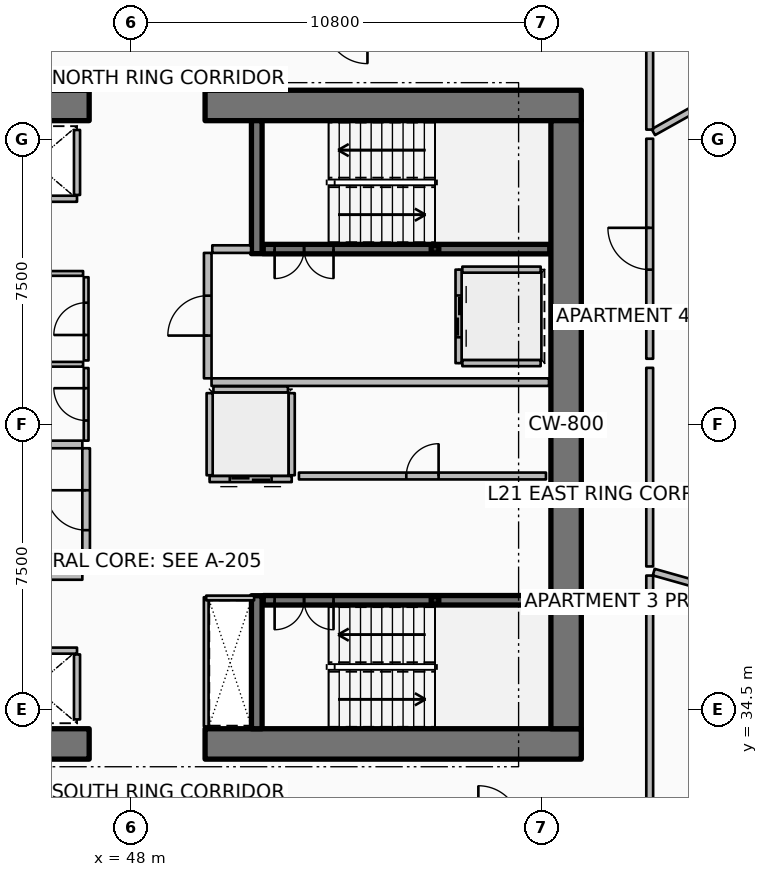
"""IFC4 building model, lengths in metres.
Left out: names, types, materials, properties, quantities, classifications, styles, units other than length and angle.
Written with IfcOpenShell. Run it as: python <this file> out.ifc"""

import sys

from ifc_helpers import new_model, si_unit, direction, frame, frame_2d, origin, origin_2d, place, context, subcontext, project, spatial, rectangle, hollow_rectangle, extrude, element, fill, save


model = new_model("IFC4")
c1 = context("Model", 3, precision=1e-05, world=origin(), true_north=direction((0.0, 1.0)))
c2 = subcontext(c1, "Body", "Model", "MODEL_VIEW")
j1 = project(units=[si_unit("LENGTHUNIT", "METRE"), si_unit("PLANEANGLEUNIT", "RADIAN")], contexts=[c1])
p1 = place(None, origin())
s1 = spatial("IfcSite", under=j1, at=p1, CompositionType="ELEMENT")
p2 = place(p1, origin())
s2 = spatial("IfcBuilding", under=s1, at=p2, CompositionType="ELEMENT")
p3 = place(p2, frame((0.0, 0.0, 86.4)))
s3 = spatial("IfcBuildingStorey", under=s2, at=p3, CompositionType="ELEMENT", Elevation=86.4)
p4 = place(p3, frame((37.0, 33.6, 0.0), z_axis=(0.0, 0.0, 1.0), x_axis=(1.0, 0.0, 0.0)))
e1 = element("IfcWall", 1, at=p4, inside=s3, PredefinedType="SHEAR", context=c2, shape_type="SweptSolid", body=[
    extrude(rectangle(XDim=9.9, YDim=0.8, at=frame_2d((4.95, 0.0))), origin(), (0.0, 0.0, 1.0), 3.75),
])
p5 = place(p3, frame((49.95, 33.6, 0.0), z_axis=(0.0, 0.0, 1.0), x_axis=(1.0, 0.0, 0.0)))
e2 = element("IfcWall", 2, at=p5, inside=s3, PredefinedType="SHEAR", context=c2, shape_type="SweptSolid", body=[
    extrude(rectangle(XDim=9.9, YDim=0.8, at=frame_2d((4.95, 0.0))), origin(), (0.0, 0.0, 1.0), 3.75),
])
p6 = place(p3, frame((37.0, 50.4, 0.0), z_axis=(0.0, 0.0, 1.0), x_axis=(1.0, 0.0, 0.0)))
e3 = element("IfcWall", 3, at=p6, inside=s3, PredefinedType="SHEAR", context=c2, shape_type="SweptSolid", body=[
    extrude(rectangle(XDim=9.9, YDim=0.8, at=frame_2d((4.95, 0.0))), origin(), (0.0, 0.0, 1.0), 3.75),
])
p7 = place(p3, frame((49.95, 50.4, 0.0), z_axis=(0.0, 0.0, 1.0), x_axis=(1.0, 0.0, 0.0)))
e4 = element("IfcWall", 4, at=p7, inside=s3, PredefinedType="SHEAR", context=c2, shape_type="SweptSolid", body=[
    extrude(rectangle(XDim=9.9, YDim=0.8, at=frame_2d((4.95, 0.0))), origin(), (0.0, 0.0, 1.0), 3.75),
])
p8 = place(p3, frame((59.45, 34.0, 0.0), z_axis=(0.0, 0.0, 1.0), x_axis=(0.0, 1.0, 0.0)))
e5 = element("IfcWall", 5, at=p8, inside=s3, PredefinedType="SHEAR", context=c2, shape_type="SweptSolid", body=[
    extrude(rectangle(XDim=16.0, YDim=0.8, at=frame_2d((8.0, 0.0))), origin(), (0.0, 0.0, 1.0), 3.75),
])
for number, where, z_axis, x_axis in (
    (6, (51.31, 46.5, 0.0), (0.0, 0.0, 1.0), (0.0, 1.0, 0.0)),
    (7, (51.31, 34.0, 0.0), (0.0, 0.0, 1.0), (0.0, 1.0, 0.0)),
):
    element("IfcWall", number, at=place(p3, frame(where, z_axis=z_axis, x_axis=x_axis)), inside=s3, PredefinedType="SHEAR", context=c2, shape_type="SweptSolid", body=[
        extrude(rectangle(XDim=3.5, YDim=0.28, at=frame_2d((1.75, 0.0))), origin(), (0.0, 0.0, 1.0), 3.75),
    ])
for number, where, z_axis, x_axis in (
    (8, (56.0, 46.62, 0.0), (0.0, 0.0, 1.0), (1.0, 0.0, 0.0)),
    (9, (56.0, 37.38, 0.0), (0.0, 0.0, 1.0), (1.0, 0.0, 0.0)),
):
    element("IfcColumn", number, at=place(p3, frame(where, z_axis=z_axis, x_axis=x_axis)), inside=s3, PredefinedType="COLUMN", context=c2, shape_type="SweptSolid", body=[
        extrude(hollow_rectangle(XDim=0.2, YDim=0.2, WallThickness=0.01, InnerFilletRadius=0.01, OuterFilletRadius=0.02, at=origin_2d()), origin(), (0.0, 0.0, 1.0), 1.67),
    ])
p9 = place(p3, frame((51.48, 46.62, 0.0), z_axis=(0.0, 0.0, 1.0), x_axis=(1.0, 0.0, 0.0)))
e10 = element("IfcWall", 10, at=p9, inside=s3, PredefinedType="SOLIDWALL", context=c2, shape_type="SweptSolid", body=[
    extrude(rectangle(XDim=7.54, YDim=0.25, at=frame_2d((3.77, 0.0))), origin(), (0.0, 0.0, 1.0), 3.5),
])
p10 = place(p9, frame((0.3, 0.0, 0.0)))
e11 = element("IfcOpeningElement", 11, at=p10, cuts=e10, PredefinedType="OPENING", context=c2, shape_type="SweptSolid", body=[
    extrude(rectangle(XDim=1.55, YDim=2.15, at=frame_2d((0.775, 1.075))), frame((0.0, 0.135, 0.0), z_axis=(0.0, -1.0, 0.0), x_axis=(1.0, 0.0, 0.0)), (0.0, 0.0, 1.0), 0.27),
])
p11 = place(p3, frame((51.48, 37.38, 0.0), z_axis=(0.0, 0.0, 1.0), x_axis=(1.0, 0.0, 0.0)))
e12 = element("IfcWall", 12, at=p11, inside=s3, PredefinedType="SOLIDWALL", context=c2, shape_type="SweptSolid", body=[
    extrude(rectangle(XDim=7.54, YDim=0.25, at=frame_2d((3.77, 0.0))), origin(), (0.0, 0.0, 1.0), 3.5),
])
p12 = place(p11, frame((0.3, 0.0, 0.0)))
e13 = element("IfcOpeningElement", 13, at=p12, cuts=e12, PredefinedType="OPENING", context=c2, shape_type="SweptSolid", body=[
    extrude(rectangle(XDim=1.55, YDim=2.15, at=frame_2d((0.775, 1.075))), frame((0.0, 0.135, 0.0), z_axis=(0.0, -1.0, 0.0), x_axis=(1.0, 0.0, 0.0)), (0.0, 0.0, 1.0), 0.27),
])
p13 = place(p3, frame((46.58, 47.945, 0.0), z_axis=(0.0, 0.0, 1.0), x_axis=(-1.0, 0.0, 0.0)))
e14 = element("IfcWall", 14, at=p13, inside=s3, PredefinedType="PARTITIONING", context=c2, shape_type="SweptSolid", body=[
    extrude(rectangle(XDim=2.26, YDim=0.16, at=frame_2d((1.13, 0.0))), origin(), (0.0, 0.0, 1.0), 3.5),
])
p14 = place(p3, frame((46.58, 48.045, 0.0), z_axis=(0.0, 0.0, 1.0), x_axis=(0.0, 1.0, 0.0)))
e15 = element("IfcWall", 15, at=p14, inside=s3, PredefinedType="PARTITIONING", context=c2, shape_type="SweptSolid", body=[
    extrude(rectangle(XDim=1.71, YDim=0.16, at=frame_2d((0.855, 0.0))), origin(), (0.0, 0.0, 1.0), 3.5),
])
p15 = place(p3, frame((44.32, 36.055, 0.0), z_axis=(0.0, 0.0, 1.0), x_axis=(1.0, 0.0, 0.0)))
e16 = element("IfcWall", 16, at=p15, inside=s3, PredefinedType="PARTITIONING", context=c2, shape_type="SweptSolid", body=[
    extrude(rectangle(XDim=2.26, YDim=0.16, at=frame_2d((1.13, 0.0))), origin(), (0.0, 0.0, 1.0), 3.5),
])
p16 = place(p3, frame((46.58, 34.245, 0.0), z_axis=(0.0, 0.0, 1.0), x_axis=(0.0, 1.0, 0.0)))
e17 = element("IfcWall", 17, at=p16, inside=s3, PredefinedType="PARTITIONING", context=c2, shape_type="SweptSolid", body=[
    extrude(rectangle(XDim=1.71, YDim=0.16, at=frame_2d((0.855, 0.0))), origin(), (0.0, 0.0, 1.0), 3.5),
])
p17 = place(p3, frame((56.62, 46.08, 0.0), z_axis=(0.0, 0.0, 1.0), x_axis=(0.0, -1.0, 0.0)))
e18 = element("IfcWall", 18, at=p17, inside=s3, PredefinedType="PARTITIONING", context=c2, shape_type="SweptSolid", body=[
    extrude(rectangle(XDim=2.46, YDim=0.16, at=frame_2d((1.23, 0.0))), origin(), (0.0, 0.0, 1.0), 3.5),
])
p18 = place(p17, frame((0.68, 0.0, 0.0)))
e19 = element("IfcOpeningElement", 19, at=p18, cuts=e18, PredefinedType="OPENING", context=c2, shape_type="SweptSolid", body=[
    extrude(rectangle(XDim=1.1, YDim=2.1, at=frame_2d((0.55, 1.05))), frame((0.0, 0.09, 0.0), z_axis=(0.0, -1.0, 0.0), x_axis=(1.0, 0.0, 0.0)), (0.0, 0.0, 1.0), 0.18),
])
for number, where, z_axis, x_axis in (
    (20, (56.72, 46.08, 0.0), (0.0, 0.0, 1.0), (1.0, 0.0, 0.0)),
    (21, (56.72, 43.62, 0.0), (0.0, 0.0, 1.0), (1.0, 0.0, 0.0)),
):
    element("IfcWall", number, at=place(p3, frame(where, z_axis=z_axis, x_axis=x_axis)), inside=s3, PredefinedType="PARTITIONING", context=c2, shape_type="SweptSolid", body=[
        extrude(rectangle(XDim=2.06, YDim=0.16, at=frame_2d((1.03, 0.0))), origin(), (0.0, 0.0, 1.0), 3.5),
    ])
p19 = place(p3, frame((52.23, 40.57, 0.0), z_axis=(0.0, 0.0, 1.0), x_axis=(-1.0, 0.0, 0.0)))
e22 = element("IfcWall", 22, at=p19, inside=s3, PredefinedType="PARTITIONING", context=c2, shape_type="SweptSolid", body=[
    extrude(rectangle(XDim=2.16, YDim=0.16, at=frame_2d((1.08, 0.0))), origin(), (0.0, 0.0, 1.0), 3.5),
])
p20 = place(p19, frame((0.53, 0.0, 0.0)))
e23 = element("IfcOpeningElement", 23, at=p20, cuts=e22, PredefinedType="OPENING", context=c2, shape_type="SweptSolid", body=[
    extrude(rectangle(XDim=1.1, YDim=2.1, at=frame_2d((0.55, 1.05))), frame((0.0, 0.09, 0.0), z_axis=(0.0, -1.0, 0.0), x_axis=(1.0, 0.0, 0.0)), (0.0, 0.0, 1.0), 0.18),
])
for number, where, z_axis, x_axis in (
    (24, (52.23, 40.67, 0.0), (0.0, 0.0, 1.0), (0.0, 1.0, 0.0)),
    (25, (50.07, 40.67, 0.0), (0.0, 0.0, 1.0), (0.0, 1.0, 0.0)),
):
    element("IfcWall", number, at=place(p3, frame(where, z_axis=z_axis, x_axis=x_axis)), inside=s3, PredefinedType="PARTITIONING", context=c2, shape_type="SweptSolid", body=[
        extrude(rectangle(XDim=2.16, YDim=0.16, at=frame_2d((1.08, 0.0))), origin(), (0.0, 0.0, 1.0), 3.5),
    ])
p21 = place(p3, frame((50.17, 42.93, 0.0), z_axis=(0.0, 0.0, 1.0), x_axis=(1.0, 0.0, 0.0)))
e26 = element("IfcWall", 26, at=p21, inside=s3, PredefinedType="PARTITIONING", context=c2, shape_type="SweptSolid", body=[
    extrude(rectangle(XDim=1.96, YDim=0.16, at=frame_2d((0.98, 0.0))), origin(), (0.0, 0.0, 1.0), 3.5),
])
p22 = place(p3, frame((52.42, 40.65, 0.0), z_axis=(0.0, 0.0, 1.0), x_axis=(1.0, 0.0, 0.0)))
e27 = element("IfcWall", 27, at=p22, inside=s3, PredefinedType="PARTITIONING", context=c2, shape_type="SweptSolid", body=[
    extrude(rectangle(XDim=6.5, YDim=0.18, at=frame_2d((3.25, 0.0))), origin(), (0.0, 0.0, 1.0), 3.5),
])
p23 = place(p22, frame((2.825, 0.0, 0.0)))
e28 = element("IfcOpeningElement", 28, at=p23, cuts=e27, PredefinedType="OPENING", context=c2, shape_type="SweptSolid", body=[
    extrude(rectangle(XDim=0.85, YDim=2.06, at=frame_2d((0.425, 1.03))), frame((0.0, 0.1, 0.0), z_axis=(0.0, -1.0, 0.0), x_axis=(1.0, 0.0, 0.0)), (0.0, 0.0, 1.0), 0.2),
])
p24 = place(p3, frame((41.35, 38.02, 0.0), z_axis=(0.0, 0.0, 1.0), x_axis=(1.0, 0.0, 0.0)))
e29 = element("IfcWall", 29, at=p24, inside=s3, PredefinedType="PARTITIONING", context=c2, shape_type="SweptSolid", body=[
    extrude(rectangle(XDim=5.37, YDim=0.2, at=frame_2d((2.685, 0.0))), origin(), (0.0, 0.0, 1.0), 3.5),
])
p25 = place(p3, frame((43.92, 41.48, 0.0), z_axis=(0.0, 0.0, 1.0), x_axis=(1.0, 0.0, 0.0)))
e30 = element("IfcWall", 30, at=p25, inside=s3, PredefinedType="PARTITIONING", context=c2, shape_type="SweptSolid", body=[
    extrude(rectangle(XDim=2.8, YDim=0.2, at=frame_2d((1.4, 0.0))), origin(), (0.0, 0.0, 1.0), 3.5),
])
p26 = place(p3, frame((46.82, 38.12, 0.0), z_axis=(0.0, 0.0, 1.0), x_axis=(0.0, 1.0, 0.0)))
e31 = element("IfcWall", 31, at=p26, inside=s3, PredefinedType="PARTITIONING", context=c2, shape_type="SweptSolid", body=[
    extrude(rectangle(XDim=3.26, YDim=0.2, at=frame_2d((1.63, 0.0))), origin(), (0.0, 0.0, 1.0), 3.5),
])
p27 = place(p26, frame((1.105, 0.0, 0.0)))
e32 = element("IfcOpeningElement", 32, at=p27, cuts=e31, PredefinedType="OPENING", context=c2, shape_type="SweptSolid", body=[
    extrude(rectangle(XDim=1.05, YDim=2.1, at=frame_2d((0.525, 1.05))), frame((0.0, 0.11, 0.0), z_axis=(0.0, -1.0, 0.0), x_axis=(1.0, 0.0, 0.0)), (0.0, 0.0, 1.0), 0.22),
])
p28 = place(p3, frame((50.12, 43.12, 0.0), z_axis=(0.0, 0.0, 1.0), x_axis=(1.0, 0.0, 0.0)))
e33 = element("IfcWall", 33, at=p28, inside=s3, PredefinedType="PARTITIONING", context=c2, shape_type="SweptSolid", body=[
    extrude(rectangle(XDim=8.88, YDim=0.2, at=frame_2d((4.44, 0.0))), origin(), (0.0, 0.0, 1.0), 3.5),
])
p29 = place(p3, frame((50.14, 46.62, 0.0), z_axis=(0.0, 0.0, 1.0), x_axis=(1.0, 0.0, 0.0)))
e34 = element("IfcWall", 34, at=p29, inside=s3, PredefinedType="PARTITIONING", context=c2, shape_type="SweptSolid", body=[
    extrude(rectangle(XDim=1.02, YDim=0.2, at=frame_2d((0.51, 0.0))), origin(), (0.0, 0.0, 1.0), 3.5),
])
p30 = place(p3, frame((50.02, 43.22, 0.0), z_axis=(0.0, 0.0, 1.0), x_axis=(0.0, 1.0, 0.0)))
e35 = element("IfcWall", 35, at=p30, inside=s3, PredefinedType="PARTITIONING", context=c2, shape_type="SweptSolid", body=[
    extrude(rectangle(XDim=3.3, YDim=0.2, at=frame_2d((1.65, 0.0))), origin(), (0.0, 0.0, 1.0), 3.5),
])
p31 = place(p30, frame((1.125, 0.0, 0.0)))
e36 = element("IfcOpeningElement", 36, at=p31, cuts=e35, PredefinedType="OPENING", context=c2, shape_type="SweptSolid", body=[
    extrude(rectangle(XDim=1.05, YDim=2.1, at=frame_2d((0.525, 1.05))), frame((0.0, 0.11, 0.0), z_axis=(0.0, -1.0, 0.0), x_axis=(1.0, 0.0, 0.0)), (0.0, 0.0, 1.0), 0.22),
])
p32 = place(p3, frame((49.98, 34.06, 0.0), z_axis=(0.0, 0.0, 1.0), x_axis=(0.0, 1.0, 0.0)))
e37 = element("IfcWall", 37, at=p32, inside=s3, PredefinedType="PARTITIONING", context=c2, shape_type="SweptSolid", body=[
    extrude(rectangle(XDim=3.4, YDim=0.125, at=frame_2d((1.7, 0.0))), origin(), (0.0, 0.0, 1.0), 2.94),
])
p33 = place(p3, frame((49.98, 37.44, 0.0), z_axis=(0.0, 0.0, 1.0), x_axis=(1.0, 0.0, 0.0)))
e38 = element("IfcWall", 38, at=p33, inside=s3, PredefinedType="PARTITIONING", context=c2, shape_type="SweptSolid", body=[
    extrude(rectangle(XDim=1.26, YDim=0.125, at=frame_2d((0.63, 0.0))), origin(), (0.0, 0.0, 1.0), 2.94),
])
p34 = place(p3, frame((44.03, 43.59, 0.0), z_axis=(0.0, 0.0, 1.0), x_axis=(1.0, 0.0, 0.0)))
e39 = element("IfcWall", 39, at=p34, inside=s3, PredefinedType="PARTITIONING", context=c2, shape_type="SweptSolid", body=[
    extrude(rectangle(XDim=2.71, YDim=0.125, at=frame_2d((1.355, 0.0))), origin(), (0.0, 0.0, 1.0), 2.94),
])
p35 = place(p3, frame((46.82, 41.58, 0.0), z_axis=(0.0, 0.0, 1.0), x_axis=(0.0, 1.0, 0.0)))
e40 = element("IfcWall", 40, at=p35, inside=s3, PredefinedType="PARTITIONING", context=c2, shape_type="SweptSolid", body=[
    extrude(rectangle(XDim=1.91, YDim=0.125, at=frame_2d((0.955, 0.0))), origin(), (0.0, 0.0, 1.0), 2.94),
])
p36 = place(p35, frame((0.53, 0.0, 0.0)))
e41 = element("IfcOpeningElement", 41, at=p36, cuts=e40, PredefinedType="OPENING", context=c2, shape_type="SweptSolid", body=[
    extrude(rectangle(XDim=0.85, YDim=2.06, at=frame_2d((0.425, 1.03))), frame((0.0, 0.073, 0.0), z_axis=(0.0, -1.0, 0.0), x_axis=(1.0, 0.0, 0.0)), (0.0, 0.0, 1.0), 0.145),
])
p37 = place(p3, frame((46.82, 43.69, 0.0), z_axis=(0.0, 0.0, 1.0), x_axis=(0.0, 1.0, 0.0)))
e42 = element("IfcWall", 42, at=p37, inside=s3, PredefinedType="PARTITIONING", context=c2, shape_type="SweptSolid", body=[
    extrude(rectangle(XDim=2.19, YDim=0.125, at=frame_2d((1.095, 0.0))), origin(), (0.0, 0.0, 1.0), 2.94),
])
p38 = place(p37, frame((0.67, 0.0, 0.0)))
e43 = element("IfcOpeningElement", 43, at=p38, cuts=e42, PredefinedType="OPENING", context=c2, shape_type="SweptSolid", body=[
    extrude(rectangle(XDim=0.85, YDim=2.06, at=frame_2d((0.425, 1.03))), frame((0.0, 0.073, 0.0), z_axis=(0.0, -1.0, 0.0), x_axis=(1.0, 0.0, 0.0)), (0.0, 0.0, 1.0), 0.145),
])
p39 = place(p3, frame((45.48, 45.98, 0.0), z_axis=(0.0, 0.0, 1.0), x_axis=(1.0, 0.0, 0.0)))
e44 = element("IfcWall", 44, at=p39, inside=s3, PredefinedType="PARTITIONING", context=c2, shape_type="SweptSolid", body=[
    extrude(rectangle(XDim=1.26, YDim=0.125, at=frame_2d((0.63, 0.0))), origin(), (0.0, 0.0, 1.0), 2.94),
])
p40 = place(p3, frame((61.746, 49.698, 0.0), z_axis=(0.0, 0.0, 1.0), x_axis=(0.872489938668, 0.488632077256, 0.0)))
e45 = element("IfcWall", 45, at=p40, inside=s3, PredefinedType="PARTITIONING", context=c2, shape_type="SweptSolid", body=[
    extrude(rectangle(XDim=13.725, YDim=0.18, at=frame_2d((6.862, 0.0))), origin(), (0.0, 0.0, 1.0), 2.94),
])
p41 = place(p3, frame((61.756, 38.12, 0.0), z_axis=(0.0, 0.0, 1.0), x_axis=(0.962455861176, -0.271438234756, 0.0)))
e46 = element("IfcWall", 46, at=p41, inside=s3, PredefinedType="PARTITIONING", context=c2, shape_type="SweptSolid", body=[
    extrude(rectangle(XDim=14.279, YDim=0.18, at=frame_2d((7.139, 0.0))), origin(), (0.0, 0.0, 1.0), 2.94),
])
p42 = place(p3, frame((61.65, 31.52, 0.0), z_axis=(0.0, 0.0, 1.0), x_axis=(0.0, 1.0, 0.0)))
e47 = element("IfcWall", 47, at=p42, inside=s3, PredefinedType="PARTITIONING", context=c2, shape_type="SweptSolid", body=[
    extrude(rectangle(XDim=6.51, YDim=0.18, at=frame_2d((3.255, 0.0))), origin(), (0.0, 0.0, 1.0), 2.94),
])
p43 = place(p3, frame((61.65, 43.736, 0.0), z_axis=(0.0, 0.0, 1.0), x_axis=(0.0, 1.0, 0.0)))
e48 = element("IfcWall", 48, at=p43, inside=s3, PredefinedType="PARTITIONING", context=c2, shape_type="SweptSolid", body=[
    extrude(rectangle(XDim=5.789, YDim=0.18, at=frame_2d((2.895, 0.0))), origin(), (0.0, 0.0, 1.0), 2.94),
])
p44 = place(p43, frame((2.344, 0.0, 0.0)))
e49 = element("IfcOpeningElement", 49, at=p44, cuts=e48, PredefinedType="OPENING", context=c2, shape_type="SweptSolid", body=[
    extrude(rectangle(XDim=1.1, YDim=2.1, at=frame_2d((0.55, 1.05))), frame((0.0, 0.1, 0.0), z_axis=(0.0, -1.0, 0.0), x_axis=(1.0, 0.0, 0.0)), (0.0, 0.0, 1.0), 0.2),
])
p45 = place(p3, frame((61.65, 38.27, 0.0), z_axis=(0.0, 0.0, 1.0), x_axis=(0.0, 1.0, 0.0)))
e50 = element("IfcWall", 50, at=p45, inside=s3, PredefinedType="PARTITIONING", context=c2, shape_type="SweptSolid", body=[
    extrude(rectangle(XDim=5.225, YDim=0.18, at=frame_2d((2.613, 0.0))), origin(), (0.0, 0.0, 1.0), 2.94),
])
p46 = place(p3, frame((61.65, 49.764, 0.0), z_axis=(0.0, 0.0, 1.0), x_axis=(0.0, 1.0, 0.0)))
e51 = element("IfcWall", 51, at=p46, inside=s3, PredefinedType="PARTITIONING", context=c2, shape_type="SweptSolid", body=[
    extrude(rectangle(XDim=2.716, YDim=0.18, at=frame_2d((1.358, 0.0))), origin(), (0.0, 0.0, 1.0), 2.94),
])
p47 = place(p10, origin())
e52 = element("IfcDoor", 52, at=p47, inside=s3, OperationType="DOUBLE_DOOR_SINGLE_SWING", PredefinedType="DOOR", context=c2, shape_type="SweptSolid", body=[
    extrude(rectangle(XDim=1.55, YDim=2.15, at=frame_2d((0.775, 1.075))), frame((0.0, 0.025, 0.0), z_axis=(0.0, -1.0, 0.0), x_axis=(1.0, 0.0, 0.0)), (0.0, 0.0, 1.0), 0.05),
])
fill(e11, e52)
p48 = place(p12, origin())
e53 = element("IfcDoor", 53, at=p48, inside=s3, OperationType="DOUBLE_DOOR_SINGLE_SWING", PredefinedType="DOOR", context=c2, shape_type="SweptSolid", body=[
    extrude(rectangle(XDim=1.55, YDim=2.15, at=frame_2d((0.775, 1.075))), frame((0.0, 0.025, 0.0), z_axis=(0.0, -1.0, 0.0), x_axis=(1.0, 0.0, 0.0)), (0.0, 0.0, 1.0), 0.05),
])
fill(e13, e53)
p49 = place(p18, origin())
e54 = element("IfcDoor", 54, at=p49, inside=s3, OperationType="DOUBLE_DOOR_SLIDING", PredefinedType="DOOR", context=c2, shape_type="SweptSolid", body=[
    extrude(rectangle(XDim=1.1, YDim=2.1, at=frame_2d((0.55, 1.05))), frame((0.0, 0.025, 0.0), z_axis=(0.0, -1.0, 0.0), x_axis=(1.0, 0.0, 0.0)), (0.0, 0.0, 1.0), 0.05),
])
fill(e19, e54)
p50 = place(p20, origin())
e55 = element("IfcDoor", 55, at=p50, inside=s3, OperationType="DOUBLE_DOOR_SLIDING", PredefinedType="DOOR", context=c2, shape_type="SweptSolid", body=[
    extrude(rectangle(XDim=1.1, YDim=2.1, at=frame_2d((0.55, 1.05))), frame((0.0, 0.025, 0.0), z_axis=(0.0, -1.0, 0.0), x_axis=(1.0, 0.0, 0.0)), (0.0, 0.0, 1.0), 0.05),
])
fill(e23, e55)
p51 = place(p23, origin())
e56 = element("IfcDoor", 56, at=p51, inside=s3, OperationType="SINGLE_SWING_RIGHT", PredefinedType="DOOR", context=c2, shape_type="SweptSolid", body=[
    extrude(rectangle(XDim=0.85, YDim=2.06, at=frame_2d((0.425, 1.03))), frame((0.0, 0.025, 0.0), z_axis=(0.0, -1.0, 0.0), x_axis=(1.0, 0.0, 0.0)), (0.0, 0.0, 1.0), 0.05),
])
fill(e28, e56)
p52 = place(p27, origin())
e57 = element("IfcDoor", 57, at=p52, inside=s3, OperationType="SINGLE_SWING_RIGHT", PredefinedType="DOOR", context=c2, shape_type="SweptSolid", body=[
    extrude(rectangle(XDim=1.05, YDim=2.1, at=frame_2d((0.525, 1.05))), frame((0.0, 0.025, 0.0), z_axis=(0.0, -1.0, 0.0), x_axis=(1.0, 0.0, 0.0)), (0.0, 0.0, 1.0), 0.05),
])
fill(e32, e57)
p53 = place(p31, origin())
e58 = element("IfcDoor", 58, at=p53, inside=s3, OperationType="SINGLE_SWING_LEFT", PredefinedType="DOOR", context=c2, shape_type="SweptSolid", body=[
    extrude(rectangle(XDim=1.05, YDim=2.1, at=frame_2d((0.525, 1.05))), frame((0.0, 0.025, 0.0), z_axis=(0.0, -1.0, 0.0), x_axis=(1.0, 0.0, 0.0)), (0.0, 0.0, 1.0), 0.05),
])
fill(e36, e58)
p54 = place(p36, origin())
e59 = element("IfcDoor", 59, at=p54, inside=s3, OperationType="SINGLE_SWING_RIGHT", PredefinedType="DOOR", context=c2, shape_type="SweptSolid", body=[
    extrude(rectangle(XDim=0.85, YDim=2.06, at=frame_2d((0.425, 1.03))), frame((0.0, 0.025, 0.0), z_axis=(0.0, -1.0, 0.0), x_axis=(1.0, 0.0, 0.0)), (0.0, 0.0, 1.0), 0.05),
])
fill(e41, e59)
p55 = place(p38, origin())
e60 = element("IfcDoor", 60, at=p55, inside=s3, OperationType="SINGLE_SWING_LEFT", PredefinedType="DOOR", context=c2, shape_type="SweptSolid", body=[
    extrude(rectangle(XDim=0.85, YDim=2.06, at=frame_2d((0.425, 1.03))), frame((0.0, 0.025, 0.0), z_axis=(0.0, -1.0, 0.0), x_axis=(1.0, 0.0, 0.0)), (0.0, 0.0, 1.0), 0.05),
])
fill(e43, e60)
p56 = place(p44, origin())
e61 = element("IfcDoor", 61, at=p56, inside=s3, OperationType="SINGLE_SWING_RIGHT", PredefinedType="DOOR", context=c2, shape_type="SweptSolid", body=[
    extrude(rectangle(XDim=1.1, YDim=2.1, at=frame_2d((0.55, 1.05))), frame((0.0, 0.025, 0.0), z_axis=(0.0, -1.0, 0.0), x_axis=(1.0, 0.0, 0.0)), (0.0, 0.0, 1.0), 0.05),
])
fill(e49, e61)
save(model, sys.argv[1])
